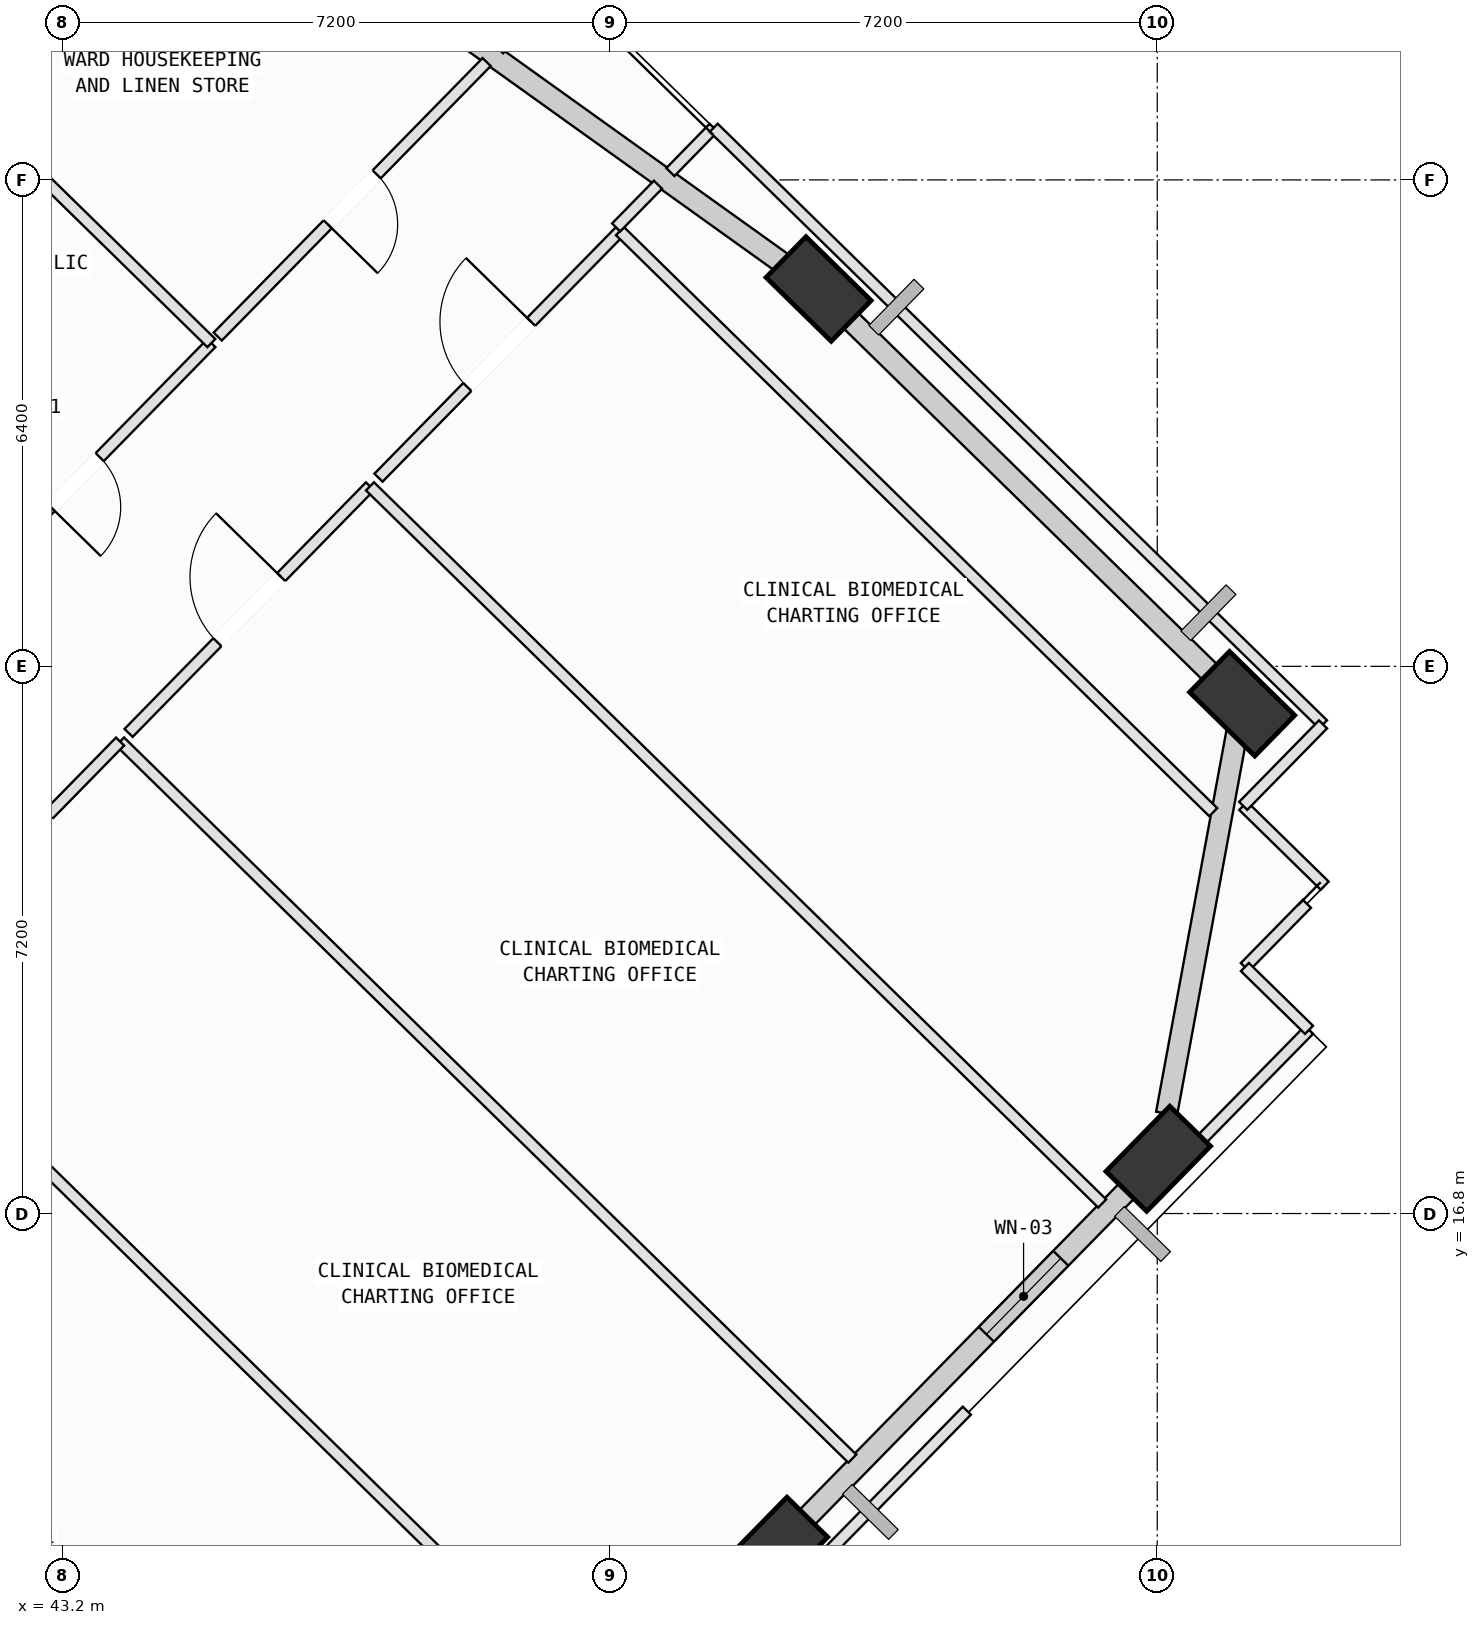
"""IFC4 building model, lengths in metres.
Left out: names, types, materials, properties, quantities, classifications, styles, units other than length and angle.
Written with IfcOpenShell. Run it as: python <this file> out.ifc"""

import sys

from ifc_helpers import new_model, si_unit, direction, frame, frame_2d, origin, origin_2d, place, context, subcontext, project, spatial, rectangle, extrude, element, fill, save


model = new_model("IFC4")
c1 = context("Model", 3, precision=1e-05, world=origin(), true_north=direction((0.0, 1.0)))
c2 = subcontext(c1, "Body", "Model", "MODEL_VIEW")
j1 = project(units=[si_unit("LENGTHUNIT", "METRE"), si_unit("PLANEANGLEUNIT", "RADIAN")], contexts=[c1])
p1 = place(None, origin())
s1 = spatial("IfcSite", under=j1, at=p1, CompositionType="ELEMENT")
p2 = place(p1, origin())
s2 = spatial("IfcBuilding", under=s1, at=p2, CompositionType="ELEMENT")
p3 = place(p2, frame((0.0, 0.0, 219.2)))
s3 = spatial("IfcBuildingStorey", under=s2, at=p3, CompositionType="ELEMENT", Elevation=219.2)
p4 = place(p3, frame((52.576, 12.376, 0.002), z_axis=(0.05060454574, 0.078765488863, 0.995607943778), x_axis=(-0.973141214407, -0.220277069584, 0.066889382094)))
e1 = element("IfcColumn", 1, at=p4, inside=s3, PredefinedType="COLUMN", context=c2, shape_type="SweptSolid", body=[
    extrude(rectangle(XDim=1.2, YDim=0.75, at=origin_2d()), origin(), (0.0, 0.0, 1.0), 4.014),
])
p5 = place(p3, frame((57.613, 17.521, 0.002), z_axis=(0.029166291589, 0.099286917616, 0.994631306276), x_axis=(-0.871590129907, -0.48462793103, 0.073935200785)))
e2 = element("IfcColumn", 2, at=p5, inside=s3, PredefinedType="COLUMN", context=c2, shape_type="SweptSolid", body=[
    extrude(rectangle(XDim=1.2, YDim=0.75, at=origin_2d()), origin(), (0.0, 0.0, 1.0), 4.018),
])
p6 = place(p3, frame((58.717, 23.508, 0.002), z_axis=(0.004435608601, 0.103598803637, 0.994609276682), x_axis=(0.684051209569, -0.725817015381, 0.07255069173)))
e3 = element("IfcColumn", 3, at=p6, inside=s3, PredefinedType="COLUMN", context=c2, shape_type="SweptSolid", body=[
    extrude(rectangle(XDim=1.2, YDim=0.75, at=origin_2d()), origin(), (0.0, 0.0, 1.0), 4.018),
])
p7 = place(p3, frame((53.144, 28.965, 0.002), z_axis=(-0.017899445582, 0.080608387587, 0.99658511814), x_axis=(0.848634875968, -0.525814786708, 0.05777246204)))
e4 = element("IfcColumn", 4, at=p7, inside=s3, PredefinedType="COLUMN", context=c2, shape_type="SweptSolid", body=[
    extrude(rectangle(XDim=1.2, YDim=0.75, at=origin_2d()), origin(), (0.0, 0.0, 1.0), 4.01),
])
p8 = place(p3, frame((57.472, 17.376, 0.0), z_axis=(0.0, 0.0, 1.0), x_axis=(-0.699669698405, -0.71446645347, 0.0)))
e5 = element("IfcWall", 5, at=p8, inside=s3, PredefinedType="SOLIDWALL", context=c2, shape_type="SweptSolid", body=[
    extrude(rectangle(XDim=6.418, YDim=0.28, at=frame_2d((3.209, 0.0))), origin(), (0.0, 0.0, 1.0), 3.265),
])
p9 = place(p8, frame((1.631, 0.0, 0.75)))
e6 = element("IfcOpeningElement", 6, at=p9, cuts=e5, PredefinedType="OPENING", context=c2, shape_type="SweptSolid", body=[
    extrude(rectangle(XDim=1.4, YDim=1.85, at=frame_2d((0.7, 0.925))), frame((0.0, 0.15, 0.0), z_axis=(0.0, -1.0, 0.0), x_axis=(1.0, 0.0, 0.0)), (0.0, 0.0, 1.0), 0.3),
])
p10 = place(p3, frame((58.683, 23.321, 0.0), z_axis=(0.0, 0.0, 1.0), x_axis=(-0.181327925421, -0.983422688096, 0.0)))
e7 = element("IfcWall", 7, at=p10, inside=s3, PredefinedType="SOLIDWALL", context=c2, shape_type="SweptSolid", body=[
    extrude(rectangle(XDim=5.294, YDim=0.28, at=frame_2d((2.647, 0.0))), origin(), (0.0, 0.0, 1.0), 3.265),
])
p11 = place(p3, frame((53.322, 28.791, 0.0), z_axis=(0.0, 0.0, 1.0), x_axis=(0.714465321122, -0.699670854698, 0.0)))
e8 = element("IfcWall", 8, at=p11, inside=s3, PredefinedType="SOLIDWALL", context=c2, shape_type="SweptSolid", body=[
    extrude(rectangle(XDim=7.046, YDim=0.28, at=frame_2d((3.523, 0.0))), origin(), (0.0, 0.0, 1.0), 3.265),
])
p12 = place(p3, frame((45.387, 34.52, 0.0), z_axis=(0.0, 0.0, 1.0), x_axis=(0.812998955019, -0.582265145048, 0.0)))
e9 = element("IfcWall", 9, at=p12, inside=s3, PredefinedType="SOLIDWALL", context=c2, shape_type="SweptSolid", body=[
    extrude(rectangle(XDim=9.036, YDim=0.28, at=frame_2d((4.518, 0.0))), origin(), (0.0, 0.0, 1.0), 3.265),
])
p13 = place(p3, frame((40.164, 29.573, 0.0), z_axis=(0.0, 0.0, 1.0), x_axis=(0.699668069964, 0.714468048181, 0.0)))
e10 = element("IfcWall", 10, at=p13, inside=s3, PredefinedType="SOLIDWALL", context=c2, shape_type="SweptSolid", body=[
    extrude(rectangle(XDim=6.78, YDim=0.28, at=frame_2d((3.39, 0.0))), origin(), (0.0, 0.0, 1.0), 3.165),
])
p14 = place(p13, frame((3.824, 0.0, 0.75)))
e11 = element("IfcOpeningElement", 11, at=p14, cuts=e10, PredefinedType="OPENING", context=c2, shape_type="SweptSolid", body=[
    extrude(rectangle(XDim=2.0, YDim=1.95, at=frame_2d((1.0, 0.975))), frame((0.0, 0.15, 0.0), z_axis=(0.0, -1.0, 0.0), x_axis=(1.0, 0.0, 0.0)), (0.0, 0.0, 1.0), 0.3),
])
p15 = place(p3, frame((37.377, 16.294, 0.0), z_axis=(0.0, 0.0, 1.0), x_axis=(0.714446126833, -0.699690454311, 0.0)))
e12 = element("IfcWall", 12, at=p15, inside=s3, PredefinedType="PARTITIONING", context=c2, shape_type="SweptSolid", body=[
    extrude(rectangle(XDim=13.485, YDim=0.15, at=frame_2d((6.742, 0.0))), origin(), (0.0, 0.0, 1.0), 3.78),
])
p16 = place(p15, frame((6.312, 0.0, 0.0)))
e13 = element("IfcOpeningElement", 13, at=p16, cuts=e12, PredefinedType="OPENING", context=c2, shape_type="SweptSolid", body=[
    extrude(rectangle(XDim=0.86, YDim=2.06, at=frame_2d((0.43, 1.03))), frame((0.0, 0.085, 0.0), z_axis=(0.0, -1.0, 0.0), x_axis=(1.0, 0.0, 0.0)), (0.0, 0.0, 1.0), 0.17),
])
p17 = place(p3, frame((41.23, 19.099, 0.0), z_axis=(0.0, 0.0, 1.0), x_axis=(0.714433717365, -0.699703125255, 0.0)))
e14 = element("IfcWall", 14, at=p17, inside=s3, PredefinedType="PARTITIONING", context=c2, shape_type="SweptSolid", body=[
    extrude(rectangle(XDim=12.696, YDim=0.15, at=frame_2d((6.348, 0.0))), origin(), (0.0, 0.0, 1.0), 3.78),
])
p18 = place(p3, frame((43.954, 23.01, 0.0), z_axis=(0.0, 0.0, 1.0), x_axis=(0.714437262996, -0.699699504961, 0.0)))
e15 = element("IfcWall", 15, at=p18, inside=s3, PredefinedType="PARTITIONING", context=c2, shape_type="SweptSolid", body=[
    extrude(rectangle(XDim=13.484, YDim=0.15, at=frame_2d((6.742, 0.0))), origin(), (0.0, 0.0, 1.0), 3.415),
])
p19 = place(p3, frame((41.23, 20.228, 0.0), z_axis=(0.0, 0.0, 1.0), x_axis=(0.699637463653, 0.714498019209, 0.0)))
e16 = element("IfcWall", 16, at=p19, inside=s3, PredefinedType="PARTITIONING", context=c2, shape_type="SweptSolid", body=[
    extrude(rectangle(XDim=3.894, YDim=0.15, at=frame_2d((1.947, 0.0))), origin(), (0.0, 0.0, 1.0), 3.78),
])
p20 = place(p19, frame((1.347, 0.0, 0.0)))
e17 = element("IfcOpeningElement", 17, at=p20, cuts=e16, PredefinedType="OPENING", context=c2, shape_type="SweptSolid", body=[
    extrude(rectangle(XDim=1.2, YDim=2.15, at=frame_2d((0.6, 1.075))), frame((0.0, 0.085, 0.0), z_axis=(0.0, -1.0, 0.0), x_axis=(1.0, 0.0, 0.0)), (0.0, 0.0, 1.0), 0.17),
])
p21 = place(p3, frame((44.066, 23.124, 0.0), z_axis=(0.0, 0.0, 1.0), x_axis=(0.699592189313, 0.714542349097, 0.0)))
e18 = element("IfcWall", 18, at=p21, inside=s3, PredefinedType="PARTITIONING", context=c2, shape_type="SweptSolid", body=[
    extrude(rectangle(XDim=4.54, YDim=0.15, at=frame_2d((2.27, 0.0))), origin(), (0.0, 0.0, 1.0), 3.78),
])
p22 = place(p21, frame((1.67, 0.0, 0.0)))
e19 = element("IfcOpeningElement", 19, at=p22, cuts=e18, PredefinedType="OPENING", context=c2, shape_type="SweptSolid", body=[
    extrude(rectangle(XDim=1.2, YDim=2.15, at=frame_2d((0.6, 1.075))), frame((0.0, 0.085, 0.0), z_axis=(0.0, -1.0, 0.0), x_axis=(1.0, 0.0, 0.0)), (0.0, 0.0, 1.0), 0.17),
])
p23 = place(p3, frame((47.242, 26.368, 0.0), z_axis=(0.0, 0.0, 1.0), x_axis=(0.714409925355, -0.699727417323, 0.0)))
e20 = element("IfcWall", 20, at=p23, inside=s3, PredefinedType="PARTITIONING", context=c2, shape_type="SweptSolid", body=[
    extrude(rectangle(XDim=13.485, YDim=0.15, at=frame_2d((6.743, 0.0))), origin(), (0.0, 0.0, 1.0), 3.78),
])
p24 = place(p3, frame((59.597, 19.217, 0.0), z_axis=(0.0, 0.0, 1.0), x_axis=(-0.699925026258, -0.714216324105, 0.0)))
e21 = element("IfcWall", 21, at=p24, inside=s3, PredefinedType="PARTITIONING", context=c2, shape_type="SweptSolid", body=[
    extrude(rectangle(XDim=2.802, YDim=0.15, at=frame_2d((1.401, 0.0))), origin(), (0.0, 0.0, 1.0), 3.265),
])
p25 = place(p3, frame((47.354, 26.482, 0.0), z_axis=(0.0, 0.0, 1.0), x_axis=(0.699675115153, 0.714461148863, 0.0)))
e22 = element("IfcWall", 22, at=p25, inside=s3, PredefinedType="PARTITIONING", context=c2, shape_type="SweptSolid", body=[
    extrude(rectangle(XDim=4.541, YDim=0.15, at=frame_2d((2.271, 0.0))), origin(), (0.0, 0.0, 1.0), 3.78),
])
p26 = place(p25, frame((1.67, 0.0, 0.0)))
e23 = element("IfcOpeningElement", 23, at=p26, cuts=e22, PredefinedType="OPENING", context=c2, shape_type="SweptSolid", body=[
    extrude(rectangle(XDim=1.2, YDim=2.15, at=frame_2d((0.6, 1.075))), frame((0.0, 0.085, 0.0), z_axis=(0.0, -1.0, 0.0), x_axis=(1.0, 0.0, 0.0)), (0.0, 0.0, 1.0), 0.17),
])
p27 = place(p3, frame((50.531, 29.726, 0.0), z_axis=(0.0, 0.0, 1.0), x_axis=(0.714431068807, -0.699705829563, 0.0)))
e24 = element("IfcWall", 24, at=p27, inside=s3, PredefinedType="PARTITIONING", context=c2, shape_type="SweptSolid", body=[
    extrude(rectangle(XDim=10.926, YDim=0.15, at=frame_2d((5.463, 0.0))), origin(), (0.0, 0.0, 1.0), 3.78),
])
p28 = place(p3, frame((59.569, 20.875, 0.0), z_axis=(0.0, 0.0, 1.0), x_axis=(-0.700266156004, -0.713881860503, 0.0)))
e25 = element("IfcWall", 25, at=p28, inside=s3, PredefinedType="PARTITIONING", context=c2, shape_type="SweptSolid", body=[
    extrude(rectangle(XDim=1.166, YDim=0.15, at=frame_2d((0.583, 0.0))), origin(), (0.0, 0.0, 1.0), 3.78),
])
p29 = place(p3, frame((58.753, 20.043, 0.0), z_axis=(0.0, 0.0, 1.0), x_axis=(0.714714941307, -0.699415865328, 0.0)))
e26 = element("IfcWall", 26, at=p29, inside=s3, PredefinedType="PARTITIONING", context=c2, shape_type="SweptSolid", body=[
    extrude(rectangle(XDim=1.181, YDim=0.15, at=frame_2d((0.59, 0.0))), origin(), (0.0, 0.0, 1.0), 3.78),
])
p30 = place(p3, frame((45.155, 28.253, 0.0), z_axis=(0.0, 0.0, 1.0), x_axis=(-0.699652687423, -0.714483111754, 0.0)))
e27 = element("IfcWall", 27, at=p30, inside=s3, PredefinedType="PARTITIONING", context=c2, shape_type="SweptSolid", body=[
    extrude(rectangle(XDim=5.12, YDim=0.15, at=frame_2d((2.56, 0.0))), origin(), (0.0, 0.0, 1.0), 3.78),
])
p31 = place(p30, frame((2.1, 0.0, 0.0)))
e28 = element("IfcOpeningElement", 28, at=p31, cuts=e27, PredefinedType="OPENING", context=c2, shape_type="SweptSolid", body=[
    extrude(rectangle(XDim=0.92, YDim=2.1, at=frame_2d((0.46, 1.05))), frame((0.0, 0.085, 0.0), z_axis=(0.0, -1.0, 0.0), x_axis=(1.0, 0.0, 0.0)), (0.0, 0.0, 1.0), 0.17),
])
p32 = place(p3, frame((42.029, 31.314, 0.0), z_axis=(0.0, 0.0, 1.0), x_axis=(0.71448950504, -0.69964615856, 0.0)))
e29 = element("IfcWall", 29, at=p32, inside=s3, PredefinedType="PARTITIONING", context=c2, shape_type="SweptSolid", body=[
    extrude(rectangle(XDim=4.375, YDim=0.15, at=frame_2d((2.188, 0.0))), origin(), (0.0, 0.0, 1.0), 3.78),
])
p33 = place(p3, frame((49.555, 32.746, 0.0), z_axis=(0.0, 0.0, 1.0), x_axis=(-0.699568668638, -0.714565376897, 0.0)))
e30 = element("IfcWall", 30, at=p33, inside=s3, PredefinedType="PARTITIONING", context=c2, shape_type="SweptSolid", body=[
    extrude(rectangle(XDim=0.879, YDim=0.15, at=frame_2d((0.439, 0.0))), origin(), (0.0, 0.0, 1.0), 3.78),
])
p34 = place(p3, frame((48.777, 31.951, 0.0), z_axis=(0.0, 0.0, 1.0), x_axis=(-0.699777823275, -0.714360551859, 0.0)))
e31 = element("IfcWall", 31, at=p34, inside=s3, PredefinedType="PARTITIONING", context=c2, shape_type="SweptSolid", body=[
    extrude(rectangle(XDim=5.056, YDim=0.15, at=frame_2d((2.528, 0.0))), origin(), (0.0, 0.0, 1.0), 3.78),
])
p35 = place(p34, frame((2.068, 0.0, 0.0)))
e32 = element("IfcOpeningElement", 32, at=p35, cuts=e31, PredefinedType="OPENING", context=c2, shape_type="SweptSolid", body=[
    extrude(rectangle(XDim=0.92, YDim=2.1, at=frame_2d((0.46, 1.05))), frame((0.0, 0.085, 0.0), z_axis=(0.0, -1.0, 0.0), x_axis=(1.0, 0.0, 0.0)), (0.0, 0.0, 1.0), 0.17),
])
p36 = place(p3, frame((41.638, 31.865, 0.0), z_axis=(0.0, 0.0, 1.0), x_axis=(0.699712068042, 0.714424958856, 0.0)))
e33 = element("IfcWall", 33, at=p36, inside=s3, PredefinedType="PARTITIONING", context=c2, shape_type="SweptSolid", body=[
    extrude(rectangle(XDim=5.028, YDim=0.15, at=frame_2d((2.514, 0.0))), origin(), (0.0, 0.0, 1.0), 3.165),
])
p37 = place(p3, frame((55.095, 14.206, 0.0), z_axis=(0.0, 0.0, 1.0), x_axis=(-0.699633601264, -0.714501801245, 0.0)))
e34 = element("IfcWall", 34, at=p37, inside=s3, PredefinedType="PARTITIONING", context=c2, shape_type="SweptSolid", body=[
    extrude(rectangle(XDim=6.19, YDim=0.15, at=frame_2d((3.095, 0.0))), origin(), (0.0, 0.0, 1.0), 3.78),
])
p38 = place(p3, frame((58.731, 22.164, 0.0), z_axis=(0.0, 0.0, 1.0), x_axis=(0.714390116694, -0.699747641061, 0.0)))
e35 = element("IfcWall", 35, at=p38, inside=s3, PredefinedType="PARTITIONING", context=c2, shape_type="SweptSolid", body=[
    extrude(rectangle(XDim=1.501, YDim=0.15, at=frame_2d((0.75, 0.0))), origin(), (0.0, 0.0, 1.0), 3.78),
])
p39 = place(p3, frame((50.481, 29.775, 0.0), z_axis=(0.0, 0.0, 1.0), x_axis=(0.699459673808, 0.714672067956, 0.0)))
e36 = element("IfcWall", 36, at=p39, inside=s3, PredefinedType="PARTITIONING", context=c2, shape_type="SweptSolid", body=[
    extrude(rectangle(XDim=0.786, YDim=0.15, at=frame_2d((0.393, 0.0))), origin(), (0.0, 0.0, 1.0), 3.78),
])
p40 = place(p3, frame((51.194, 30.503, 0.0), z_axis=(0.0, 0.0, 1.0), x_axis=(0.698974722782, 0.715146374466, 0.0)))
e37 = element("IfcWall", 37, at=p40, inside=s3, PredefinedType="PARTITIONING", context=c2, shape_type="SweptSolid", body=[
    extrude(rectangle(XDim=0.815, YDim=0.15, at=frame_2d((0.408, 0.0))), origin(), (0.0, 0.0, 1.0), 3.78),
])
p41 = place(p3, frame((51.764, 31.086, 0.0), z_axis=(0.0, 0.0, 1.0), x_axis=(0.714519943853, -0.69961507262, 0.0)))
e38 = element("IfcWall", 38, at=p41, inside=s3, PredefinedType="PARTITIONING", context=c2, shape_type="SweptSolid", body=[
    extrude(rectangle(XDim=11.22, YDim=0.15, at=frame_2d((5.61, 0.0))), origin(), (0.0, 0.0, 1.0), 3.265),
])
p42 = place(p3, frame((59.781, 23.236, 0.0), z_axis=(0.0, 0.0, 1.0), x_axis=(-0.699747641061, -0.714390116694, 0.0)))
e39 = element("IfcWall", 39, at=p42, inside=s3, PredefinedType="PARTITIONING", context=c2, shape_type="SweptSolid", body=[
    extrude(rectangle(XDim=1.501, YDim=0.15, at=frame_2d((0.75, 0.0))), origin(), (0.0, 0.0, 1.0), 3.78),
])
p43 = place(p9, origin())
e40 = element("IfcWindow", 40, at=p43, inside=s3, PartitioningType="SINGLE_PANEL", PredefinedType="WINDOW", context=c2, shape_type="SweptSolid", body=[
    extrude(rectangle(XDim=1.4, YDim=1.85, at=frame_2d((0.7, 0.925))), frame((0.0, 0.03, 0.0), z_axis=(0.0, -1.0, 0.0), x_axis=(1.0, 0.0, 0.0)), (0.0, 0.0, 1.0), 0.06),
])
fill(e6, e40)
p44 = place(p22, origin())
e41 = element("IfcDoor", 41, at=p44, inside=s3, OperationType="SINGLE_SWING_RIGHT", PredefinedType="DOOR", context=c2, shape_type="SweptSolid", body=[
    extrude(rectangle(XDim=1.2, YDim=2.15, at=frame_2d((0.6, 1.075))), frame((0.0, 0.025, 0.0), z_axis=(0.0, -1.0, 0.0), x_axis=(1.0, 0.0, 0.0)), (0.0, 0.0, 1.0), 0.05),
])
fill(e19, e41)
p45 = place(p26, origin())
e42 = element("IfcDoor", 42, at=p45, inside=s3, OperationType="SINGLE_SWING_RIGHT", PredefinedType="DOOR", context=c2, shape_type="SweptSolid", body=[
    extrude(rectangle(XDim=1.2, YDim=2.15, at=frame_2d((0.6, 1.075))), frame((0.0, 0.025, 0.0), z_axis=(0.0, -1.0, 0.0), x_axis=(1.0, 0.0, 0.0)), (0.0, 0.0, 1.0), 0.05),
])
fill(e23, e42)
p46 = place(p31, origin())
e43 = element("IfcDoor", 43, at=p46, inside=s3, OperationType="SINGLE_SWING_RIGHT", PredefinedType="DOOR", context=c2, shape_type="SweptSolid", body=[
    extrude(rectangle(XDim=0.92, YDim=2.1, at=frame_2d((0.46, 1.05))), frame((0.0, 0.025, 0.0), z_axis=(0.0, -1.0, 0.0), x_axis=(1.0, 0.0, 0.0)), (0.0, 0.0, 1.0), 0.05),
])
fill(e28, e43)
p47 = place(p35, origin())
e44 = element("IfcDoor", 44, at=p47, inside=s3, OperationType="SINGLE_SWING_RIGHT", PredefinedType="DOOR", context=c2, shape_type="SweptSolid", body=[
    extrude(rectangle(XDim=0.92, YDim=2.1, at=frame_2d((0.46, 1.05))), frame((0.0, 0.025, 0.0), z_axis=(0.0, -1.0, 0.0), x_axis=(1.0, 0.0, 0.0)), (0.0, 0.0, 1.0), 0.05),
])
fill(e32, e44)
save(model, sys.argv[1])
